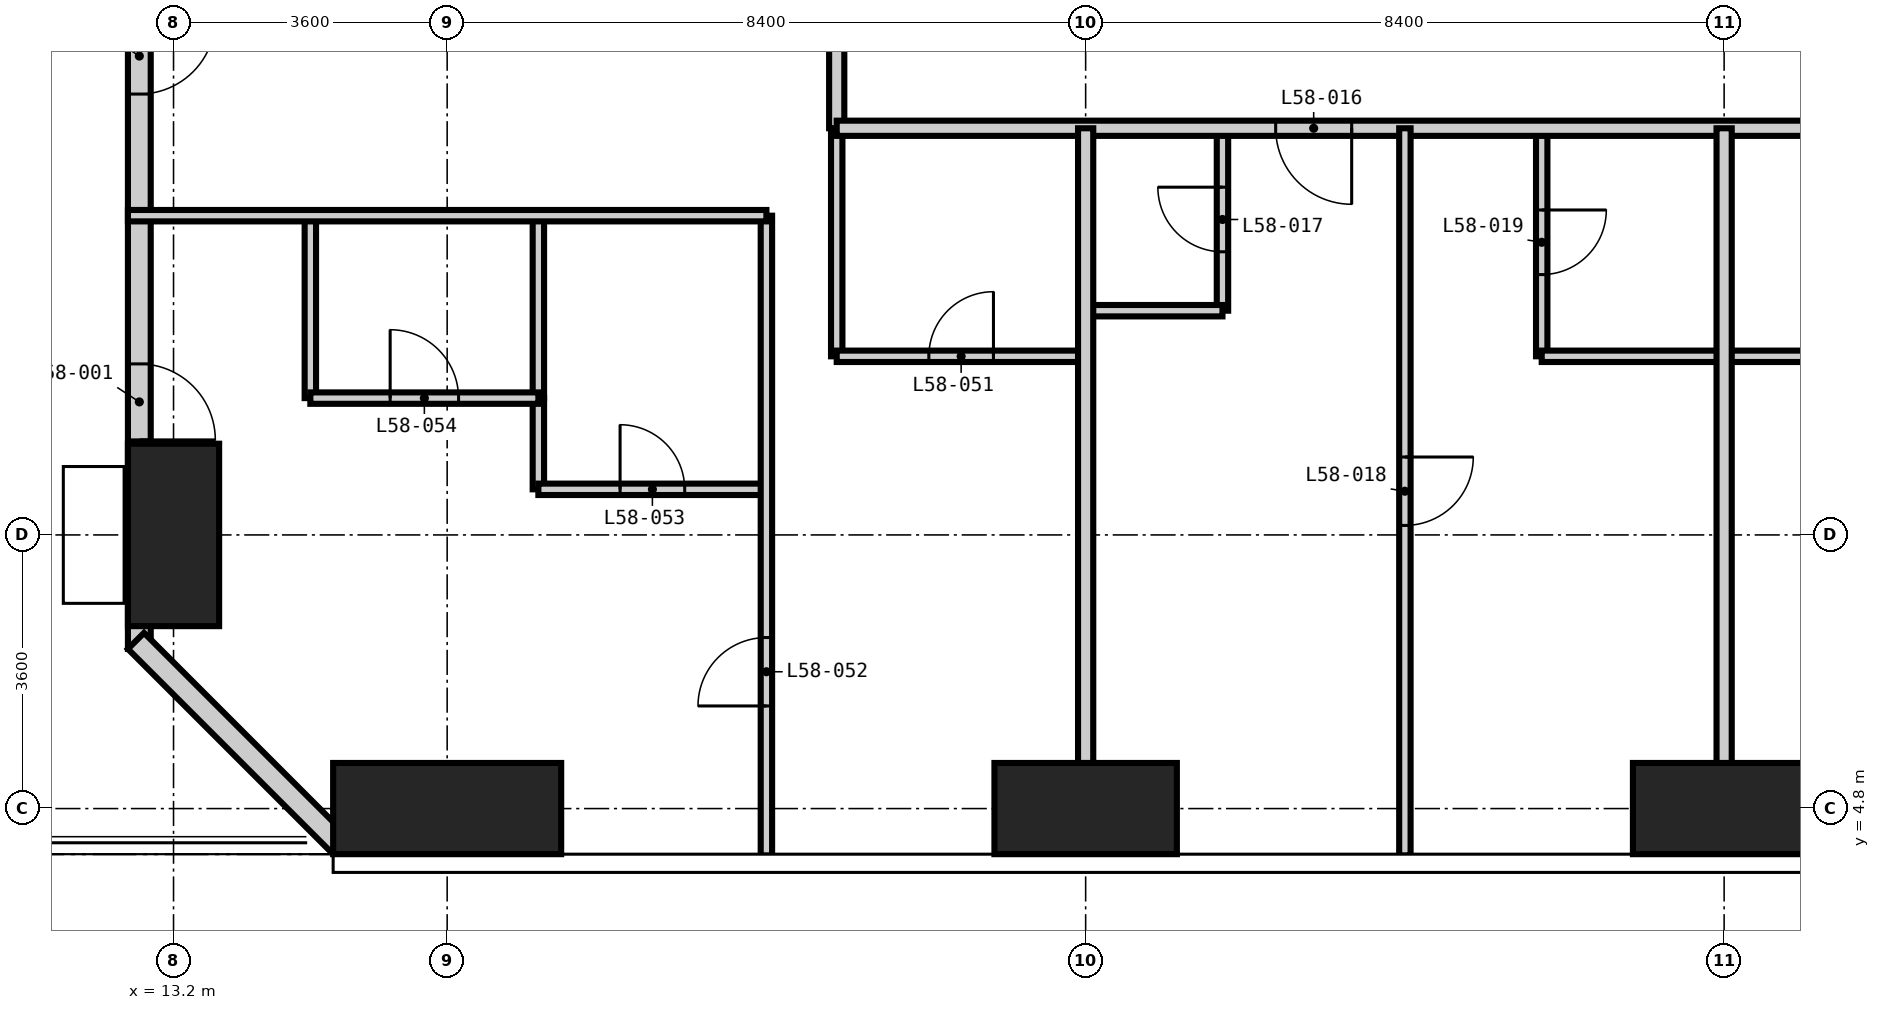
"""IFC4 building model, lengths in metres.
Left out: names, types, materials, properties, quantities, classifications, styles, units other than length and angle.
Written with IfcOpenShell. Run it as: python <this file> out.ifc"""

import sys

from ifc_helpers import new_model, si_unit, direction, frame, frame_2d, origin, origin_2d, place, context, subcontext, project, spatial, rectangle, extrude, element, fill, save


model = new_model("IFC4")
c1 = context("Model", 3, precision=1e-05, world=origin(), true_north=direction((0.0, 1.0)))
c2 = subcontext(c1, "Body", "Model", "MODEL_VIEW")
j1 = project(units=[si_unit("LENGTHUNIT", "METRE"), si_unit("PLANEANGLEUNIT", "RADIAN")], contexts=[c1])
p1 = place(None, origin())
s1 = spatial("IfcSite", under=j1, at=p1, CompositionType="ELEMENT")
p2 = place(p1, origin())
s2 = spatial("IfcBuilding", under=s1, at=p2, CompositionType="ELEMENT")
p3 = place(p2, frame((0.0, 0.0, 225.6)))
s3 = spatial("IfcBuildingStorey", under=s2, at=p3, CompositionType="ELEMENT", Elevation=225.6)
p4 = place(p3, frame((13.2, 8.4, -0.35), z_axis=(0.0, 0.0, 1.0), x_axis=(1.0, 0.0, 0.0)))
e1 = element("IfcColumn", 1, at=p4, inside=s3, PredefinedType="COLUMN", context=c2, shape_type="SweptSolid", body=[
    extrude(rectangle(XDim=1.2, YDim=2.4, at=origin_2d()), origin(), (0.0, 0.0, 1.0), 3.9),
])
p5 = place(p3, frame((16.8, 4.8, -0.35), z_axis=(0.0, 0.0, 1.0), x_axis=(1.0, 0.0, 0.0)))
e2 = element("IfcColumn", 2, at=p5, inside=s3, PredefinedType="COLUMN", context=c2, shape_type="SweptSolid", body=[
    extrude(rectangle(XDim=3.0, YDim=1.2, at=origin_2d()), origin(), (0.0, 0.0, 1.0), 3.9),
])
for number, where, z_axis, x_axis in (
    (3, (25.2, 4.8, -0.35), (0.0, 0.0, 1.0), (1.0, 0.0, 0.0)),
    (4, (33.6, 4.8, -0.35), (0.0, 0.0, 1.0), (1.0, 0.0, 0.0)),
):
    element("IfcColumn", number, at=place(p3, frame(where, z_axis=z_axis, x_axis=x_axis)), inside=s3, PredefinedType="COLUMN", context=c2, shape_type="SweptSolid", body=[
        extrude(rectangle(XDim=2.4, YDim=1.2, at=origin_2d()), origin(), (0.0, 0.0, 1.0), 3.9),
    ])
p6 = place(p3, frame((12.75, 51.9, 0.0), z_axis=(0.0, 0.0, 1.0), x_axis=(0.0, -1.0, 0.0)))
e5 = element("IfcWall", 5, at=p6, inside=s3, PredefinedType="SOLIDWALL", context=c2, shape_type="SweptSolid", body=[
    extrude(rectangle(XDim=45.0, YDim=0.3, at=frame_2d((22.5, 0.0))), origin(), (0.0, 0.0, 1.0), 3.1),
])
p7 = place(p6, frame((41.25, 0.0, 0.0)))
e6 = element("IfcOpeningElement", 6, at=p7, cuts=e5, PredefinedType="OPENING", context=c2, shape_type="SweptSolid", body=[
    extrude(rectangle(XDim=1.0, YDim=2.4, at=frame_2d((0.5, 1.2))), frame((0.0, 0.16, 0.0), z_axis=(0.0, -1.0, 0.0), x_axis=(1.0, 0.0, 0.0)), (0.0, 0.0, 1.0), 0.32),
])
p8 = place(p6, frame((36.7, 0.0, 0.0)))
e7 = element("IfcOpeningElement", 7, at=p8, cuts=e5, PredefinedType="OPENING", context=c2, shape_type="SweptSolid", body=[
    extrude(rectangle(XDim=1.0, YDim=2.4, at=frame_2d((0.5, 1.2))), frame((0.0, 0.16, 0.0), z_axis=(0.0, -1.0, 0.0), x_axis=(1.0, 0.0, 0.0)), (0.0, 0.0, 1.0), 0.32),
])
p9 = place(p6, frame((30.4, 0.0, 0.0)))
e8 = element("IfcOpeningElement", 8, at=p9, cuts=e5, PredefinedType="OPENING", context=c2, shape_type="SweptSolid", body=[
    extrude(rectangle(XDim=1.0, YDim=2.4, at=frame_2d((0.5, 1.2))), frame((0.0, 0.16, 0.0), z_axis=(0.0, -1.0, 0.0), x_axis=(1.0, 0.0, 0.0)), (0.0, 0.0, 1.0), 0.32),
])
p10 = place(p6, frame((31.7, 0.0, 0.6)))
e9 = element("IfcOpeningElement", 9, at=p10, cuts=e5, PredefinedType="OPENING", context=c2, shape_type="SweptSolid", body=[
    extrude(rectangle(XDim=1.8, YDim=2.1, at=frame_2d((0.9, 1.05))), frame((0.0, 0.16, 0.0), z_axis=(0.0, -1.0, 0.0), x_axis=(1.0, 0.0, 0.0)), (0.0, 0.0, 1.0), 0.32),
])
p11 = place(p6, frame((28.0, 0.0, 0.6)))
e10 = element("IfcOpeningElement", 10, at=p11, cuts=e5, PredefinedType="OPENING", context=c2, shape_type="SweptSolid", body=[
    extrude(rectangle(XDim=1.8, YDim=2.1, at=frame_2d((0.9, 1.05))), frame((0.0, 0.16, 0.0), z_axis=(0.0, -1.0, 0.0), x_axis=(1.0, 0.0, 0.0)), (0.0, 0.0, 1.0), 0.32),
])
p12 = place(p6, frame((24.1, 0.0, 0.0)))
e11 = element("IfcOpeningElement", 11, at=p12, cuts=e5, PredefinedType="OPENING", context=c2, shape_type="SweptSolid", body=[
    extrude(rectangle(XDim=1.0, YDim=2.4, at=frame_2d((0.5, 1.2))), frame((0.0, 0.16, 0.0), z_axis=(0.0, -1.0, 0.0), x_axis=(1.0, 0.0, 0.0)), (0.0, 0.0, 1.0), 0.32),
])
p13 = place(p6, frame((19.9, 0.0, 0.0)))
e12 = element("IfcOpeningElement", 12, at=p13, cuts=e5, PredefinedType="OPENING", context=c2, shape_type="SweptSolid", body=[
    extrude(rectangle(XDim=1.0, YDim=2.4, at=frame_2d((0.5, 1.2))), frame((0.0, 0.16, 0.0), z_axis=(0.0, -1.0, 0.0), x_axis=(1.0, 0.0, 0.0)), (0.0, 0.0, 1.0), 0.32),
])
p14 = place(p6, frame((15.7, 0.0, 0.0)))
e13 = element("IfcOpeningElement", 13, at=p14, cuts=e5, PredefinedType="OPENING", context=c2, shape_type="SweptSolid", body=[
    extrude(rectangle(XDim=1.0, YDim=2.4, at=frame_2d((0.5, 1.2))), frame((0.0, 0.16, 0.0), z_axis=(0.0, -1.0, 0.0), x_axis=(1.0, 0.0, 0.0)), (0.0, 0.0, 1.0), 0.32),
])
p15 = place(p6, frame((11.5, 0.0, 0.0)))
e14 = element("IfcOpeningElement", 14, at=p15, cuts=e5, PredefinedType="OPENING", context=c2, shape_type="SweptSolid", body=[
    extrude(rectangle(XDim=1.0, YDim=2.4, at=frame_2d((0.5, 1.2))), frame((0.0, 0.16, 0.0), z_axis=(0.0, -1.0, 0.0), x_axis=(1.0, 0.0, 0.0)), (0.0, 0.0, 1.0), 0.32),
])
p16 = place(p6, frame((7.3, 0.0, 0.0)))
e15 = element("IfcOpeningElement", 15, at=p16, cuts=e5, PredefinedType="OPENING", context=c2, shape_type="SweptSolid", body=[
    extrude(rectangle(XDim=1.0, YDim=2.4, at=frame_2d((0.5, 1.2))), frame((0.0, 0.16, 0.0), z_axis=(0.0, -1.0, 0.0), x_axis=(1.0, 0.0, 0.0)), (0.0, 0.0, 1.0), 0.32),
])
p17 = place(p6, frame((2.75, 0.0, 0.0)))
e16 = element("IfcOpeningElement", 16, at=p17, cuts=e5, PredefinedType="OPENING", context=c2, shape_type="SweptSolid", body=[
    extrude(rectangle(XDim=1.0, YDim=2.4, at=frame_2d((0.5, 1.2))), frame((0.0, 0.16, 0.0), z_axis=(0.0, -1.0, 0.0), x_axis=(1.0, 0.0, 0.0)), (0.0, 0.0, 1.0), 0.32),
])
p18 = place(p3, frame((12.706, 7.006, 0.0), z_axis=(0.0, 0.0, 1.0), x_axis=(0.707074812166, -0.707138748762, 0.0)))
e17 = element("IfcWall", 17, at=p18, inside=s3, PredefinedType="SOLIDWALL", context=c2, shape_type="SweptSolid", body=[
    extrude(rectangle(XDim=3.818, YDim=0.3, at=frame_2d((1.909, 0.0))), origin(), (0.0, 0.0, 1.0), 3.55),
])
p19 = place(p3, frame((18.0, 9.0, 0.0), z_axis=(0.0, 0.0, 1.0), x_axis=(0.0, 1.0, 0.0)))
e18 = element("IfcWall", 18, at=p19, inside=s3, PredefinedType="PARTITIONING", context=c2, shape_type="SweptSolid", body=[
    extrude(rectangle(XDim=1.2, YDim=0.15, at=frame_2d((0.6, 0.0))), origin(), (0.0, 0.0, 1.0), 3.55),
])
p20 = place(p3, frame((21.925, 10.75, 0.0), z_axis=(0.0, 0.0, 1.0), x_axis=(0.0, 1.0, 0.0)))
e19 = element("IfcWall", 19, at=p20, inside=s3, PredefinedType="PARTITIONING", context=c2, shape_type="SweptSolid", body=[
    extrude(rectangle(XDim=3.0, YDim=0.15, at=frame_2d((1.5, 0.0))), origin(), (0.0, 0.0, 1.0), 3.55),
])
p21 = place(p3, frame((27.0, 11.35, 0.0), z_axis=(0.0, 0.0, 1.0), x_axis=(0.0, 1.0, 0.0)))
e20 = element("IfcWall", 20, at=p21, inside=s3, PredefinedType="PARTITIONING", context=c2, shape_type="SweptSolid", body=[
    extrude(rectangle(XDim=2.4, YDim=0.15, at=frame_2d((1.2, 0.0))), origin(), (0.0, 0.0, 1.0), 3.55),
])
p22 = place(p21, frame((0.775, 0.0, 0.0)))
e21 = element("IfcOpeningElement", 21, at=p22, cuts=e20, PredefinedType="OPENING", context=c2, shape_type="SweptSolid", body=[
    extrude(rectangle(XDim=0.85, YDim=2.1, at=frame_2d((0.425, 1.05))), frame((0.0, 0.085, 0.0), z_axis=(0.0, -1.0, 0.0), x_axis=(1.0, 0.0, 0.0)), (0.0, 0.0, 1.0), 0.17),
])
p23 = place(p3, frame((31.2, 10.75, 0.0), z_axis=(0.0, 0.0, 1.0), x_axis=(0.0, 1.0, 0.0)))
e22 = element("IfcWall", 22, at=p23, inside=s3, PredefinedType="PARTITIONING", context=c2, shape_type="SweptSolid", body=[
    extrude(rectangle(XDim=3.0, YDim=0.15, at=frame_2d((1.5, 0.0))), origin(), (0.0, 0.0, 1.0), 3.55),
])
p24 = place(p23, frame((1.075, 0.0, 0.0)))
e23 = element("IfcOpeningElement", 23, at=p24, cuts=e22, PredefinedType="OPENING", context=c2, shape_type="SweptSolid", body=[
    extrude(rectangle(XDim=0.85, YDim=2.1, at=frame_2d((0.425, 1.05))), frame((0.0, 0.085, 0.0), z_axis=(0.0, -1.0, 0.0), x_axis=(1.0, 0.0, 0.0)), (0.0, 0.0, 1.0), 0.17),
])
p25 = place(p3, frame((18.0, 9.0, 0.0), z_axis=(0.0, 0.0, 1.0), x_axis=(1.0, 0.0, 0.0)))
e24 = element("IfcWall", 24, at=p25, inside=s3, PredefinedType="PARTITIONING", context=c2, shape_type="SweptSolid", body=[
    extrude(rectangle(XDim=3.0, YDim=0.15, at=frame_2d((1.5, 0.0))), origin(), (0.0, 0.0, 1.0), 3.55),
])
p26 = place(p25, frame((1.075, 0.0, 0.0)))
e25 = element("IfcOpeningElement", 25, at=p26, cuts=e24, PredefinedType="OPENING", context=c2, shape_type="SweptSolid", body=[
    extrude(rectangle(XDim=0.85, YDim=2.1, at=frame_2d((0.425, 1.05))), frame((0.0, 0.085, 0.0), z_axis=(0.0, -1.0, 0.0), x_axis=(1.0, 0.0, 0.0)), (0.0, 0.0, 1.0), 0.17),
])
p27 = place(p3, frame((21.925, 10.75, 0.0), z_axis=(0.0, 0.0, 1.0), x_axis=(1.0, 0.0, 0.0)))
e26 = element("IfcWall", 26, at=p27, inside=s3, PredefinedType="PARTITIONING", context=c2, shape_type="SweptSolid", body=[
    extrude(rectangle(XDim=3.275, YDim=0.15, at=frame_2d((1.637, 0.0))), origin(), (0.0, 0.0, 1.0), 3.55),
])
p28 = place(p27, frame((1.212, 0.0, 0.0)))
e27 = element("IfcOpeningElement", 27, at=p28, cuts=e26, PredefinedType="OPENING", context=c2, shape_type="SweptSolid", body=[
    extrude(rectangle(XDim=0.85, YDim=2.1, at=frame_2d((0.425, 1.05))), frame((0.0, 0.085, 0.0), z_axis=(0.0, -1.0, 0.0), x_axis=(1.0, 0.0, 0.0)), (0.0, 0.0, 1.0), 0.17),
])
p29 = place(p3, frame((31.2, 10.75, 0.0), z_axis=(0.0, 0.0, 1.0), x_axis=(1.0, 0.0, 0.0)))
e28 = element("IfcWall", 28, at=p29, inside=s3, PredefinedType="PARTITIONING", context=c2, shape_type="SweptSolid", body=[
    extrude(rectangle(XDim=4.8, YDim=0.15, at=frame_2d((2.4, 0.0))), origin(), (0.0, 0.0, 1.0), 3.55),
])
p30 = place(p3, frame((25.2, 11.35, 0.0), z_axis=(0.0, 0.0, 1.0), x_axis=(1.0, 0.0, 0.0)))
e29 = element("IfcWall", 29, at=p30, inside=s3, PredefinedType="PARTITIONING", context=c2, shape_type="SweptSolid", body=[
    extrude(rectangle(XDim=1.8, YDim=0.15, at=frame_2d((0.9, 0.0))), origin(), (0.0, 0.0, 1.0), 3.55),
])
p31 = place(p3, frame((21.925, 13.75, 0.0), z_axis=(0.0, 0.0, 1.0), x_axis=(0.0, 1.0, 0.0)))
e30 = element("IfcWall", 30, at=p31, inside=s3, PredefinedType="PARTITIONING", context=c2, shape_type="SweptSolid", body=[
    extrude(rectangle(XDim=3.05, YDim=0.2, at=frame_2d((1.525, 0.0))), origin(), (0.0, 0.0, 1.0), 3.55),
])
p32 = place(p31, frame((1.025, 0.0, 0.0)))
e31 = element("IfcOpeningElement", 31, at=p32, cuts=e30, PredefinedType="OPENING", context=c2, shape_type="SweptSolid", body=[
    extrude(rectangle(XDim=1.0, YDim=2.2, at=frame_2d((0.5, 1.1))), frame((0.0, 0.11, 0.0), z_axis=(0.0, -1.0, 0.0), x_axis=(1.0, 0.0, 0.0)), (0.0, 0.0, 1.0), 0.22),
])
p33 = place(p3, frame((45.65, 13.75, 0.0), z_axis=(0.0, 0.0, 1.0), x_axis=(-1.0, 0.0, 0.0)))
e32 = element("IfcWall", 32, at=p33, inside=s3, PredefinedType="PARTITIONING", context=c2, shape_type="SweptSolid", body=[
    extrude(rectangle(XDim=23.725, YDim=0.2, at=frame_2d((11.862, 0.0))), origin(), (0.0, 0.0, 1.0), 3.55),
])
p34 = place(p33, frame((16.95, 0.0, 0.0)))
e33 = element("IfcOpeningElement", 33, at=p34, cuts=e32, PredefinedType="OPENING", context=c2, shape_type="SweptSolid", body=[
    extrude(rectangle(XDim=1.0, YDim=2.2, at=frame_2d((0.5, 1.1))), frame((0.0, 0.11, 0.0), z_axis=(0.0, -1.0, 0.0), x_axis=(1.0, 0.0, 0.0)), (0.0, 0.0, 1.0), 0.22),
])
p35 = place(p33, frame((6.15, 0.0, 0.0)))
e34 = element("IfcOpeningElement", 34, at=p35, cuts=e32, PredefinedType="OPENING", context=c2, shape_type="SweptSolid", body=[
    extrude(rectangle(XDim=1.0, YDim=2.2, at=frame_2d((0.5, 1.1))), frame((0.0, 0.11, 0.0), z_axis=(0.0, -1.0, 0.0), x_axis=(1.0, 0.0, 0.0)), (0.0, 0.0, 1.0), 0.22),
])
for number, where, z_axis, x_axis in (
    (35, (25.2, 4.182, 0.0), (0.0, 0.0, 1.0), (0.0, 1.0, 0.0)),
    (36, (33.6, 4.182, 0.0), (0.0, 0.0, 1.0), (0.0, 1.0, 0.0)),
):
    element("IfcWall", number, at=place(p3, frame(where, z_axis=z_axis, x_axis=x_axis)), inside=s3, PredefinedType="PARTITIONING", context=c2, shape_type="SweptSolid", body=[
        extrude(rectangle(XDim=9.568, YDim=0.2, at=frame_2d((4.784, 0.0))), origin(), (0.0, 0.0, 1.0), 3.55),
    ])
for number, where, z_axis, x_axis in (
    (37, (15.0, 10.2, 0.0), (0.0, 0.0, 1.0), (0.0, 1.0, 0.0)),
    (38, (18.0, 10.2, 0.0), (0.0, 0.0, 1.0), (0.0, 1.0, 0.0)),
):
    element("IfcWall", number, at=place(p3, frame(where, z_axis=z_axis, x_axis=x_axis)), inside=s3, PredefinedType="PARTITIONING", context=c2, shape_type="SweptSolid", body=[
        extrude(rectangle(XDim=2.4, YDim=0.15, at=frame_2d((1.2, 0.0))), origin(), (0.0, 0.0, 1.0), 3.55),
    ])
p36 = place(p3, frame((21.0, 4.182, 0.0), z_axis=(0.0, 0.0, 1.0), x_axis=(0.0, 1.0, 0.0)))
e39 = element("IfcWall", 39, at=p36, inside=s3, PredefinedType="PARTITIONING", context=c2, shape_type="SweptSolid", body=[
    extrude(rectangle(XDim=8.418, YDim=0.15, at=frame_2d((4.209, 0.0))), origin(), (0.0, 0.0, 1.0), 3.55),
])
p37 = place(p36, frame((1.968, 0.0, 0.0)))
e40 = element("IfcOpeningElement", 40, at=p37, cuts=e39, PredefinedType="OPENING", context=c2, shape_type="SweptSolid", body=[
    extrude(rectangle(XDim=0.9, YDim=2.1, at=frame_2d((0.45, 1.05))), frame((0.0, 0.085, 0.0), z_axis=(0.0, -1.0, 0.0), x_axis=(1.0, 0.0, 0.0)), (0.0, 0.0, 1.0), 0.17),
])
p38 = place(p3, frame((29.4, 4.182, 0.0), z_axis=(0.0, 0.0, 1.0), x_axis=(0.0, 1.0, 0.0)))
e41 = element("IfcWall", 41, at=p38, inside=s3, PredefinedType="PARTITIONING", context=c2, shape_type="SweptSolid", body=[
    extrude(rectangle(XDim=9.568, YDim=0.15, at=frame_2d((4.784, 0.0))), origin(), (0.0, 0.0, 1.0), 3.55),
])
p39 = place(p38, frame((4.343, 0.0, 0.0)))
e42 = element("IfcOpeningElement", 42, at=p39, cuts=e41, PredefinedType="OPENING", context=c2, shape_type="SweptSolid", body=[
    extrude(rectangle(XDim=0.9, YDim=2.1, at=frame_2d((0.45, 1.05))), frame((0.0, 0.085, 0.0), z_axis=(0.0, -1.0, 0.0), x_axis=(1.0, 0.0, 0.0)), (0.0, 0.0, 1.0), 0.17),
])
p40 = place(p3, frame((15.0, 10.2, 0.0), z_axis=(0.0, 0.0, 1.0), x_axis=(1.0, 0.0, 0.0)))
e43 = element("IfcWall", 43, at=p40, inside=s3, PredefinedType="PARTITIONING", context=c2, shape_type="SweptSolid", body=[
    extrude(rectangle(XDim=3.0, YDim=0.15, at=frame_2d((1.5, 0.0))), origin(), (0.0, 0.0, 1.0), 3.55),
])
p41 = place(p40, frame((1.05, 0.0, 0.0)))
e44 = element("IfcOpeningElement", 44, at=p41, cuts=e43, PredefinedType="OPENING", context=c2, shape_type="SweptSolid", body=[
    extrude(rectangle(XDim=0.9, YDim=2.1, at=frame_2d((0.45, 1.05))), frame((0.0, 0.085, 0.0), z_axis=(0.0, -1.0, 0.0), x_axis=(1.0, 0.0, 0.0)), (0.0, 0.0, 1.0), 0.17),
])
p42 = place(p3, frame((12.6, 12.6, 0.0), z_axis=(0.0, 0.0, 1.0), x_axis=(1.0, 0.0, 0.0)))
e45 = element("IfcWall", 45, at=p42, inside=s3, PredefinedType="PARTITIONING", context=c2, shape_type="SweptSolid", body=[
    extrude(rectangle(XDim=8.4, YDim=0.15, at=frame_2d((4.2, 0.0))), origin(), (0.0, 0.0, 1.0), 3.55),
])
p43 = place(p7, origin())
e46 = element("IfcDoor", 46, at=p43, inside=s3, OperationType="SINGLE_SWING_RIGHT", PredefinedType="DOOR", context=c2, shape_type="SweptSolid", body=[
    extrude(rectangle(XDim=1.0, YDim=2.4, at=frame_2d((0.5, 1.2))), frame((0.0, 0.025, 0.0), z_axis=(0.0, -1.0, 0.0), x_axis=(1.0, 0.0, 0.0)), (0.0, 0.0, 1.0), 0.05),
])
fill(e6, e46)
p44 = place(p8, origin())
e47 = element("IfcDoor", 47, at=p44, inside=s3, OperationType="SINGLE_SWING_LEFT", PredefinedType="DOOR", context=c2, shape_type="SweptSolid", body=[
    extrude(rectangle(XDim=1.0, YDim=2.4, at=frame_2d((0.5, 1.2))), frame((0.0, 0.025, 0.0), z_axis=(0.0, -1.0, 0.0), x_axis=(1.0, 0.0, 0.0)), (0.0, 0.0, 1.0), 0.05),
])
fill(e7, e47)
p45 = place(p34, origin())
e48 = element("IfcDoor", 48, at=p45, inside=s3, OperationType="SINGLE_SWING_LEFT", PredefinedType="DOOR", context=c2, shape_type="SweptSolid", body=[
    extrude(rectangle(XDim=1.0, YDim=2.2, at=frame_2d((0.5, 1.1))), frame((0.0, 0.025, 0.0), z_axis=(0.0, -1.0, 0.0), x_axis=(1.0, 0.0, 0.0)), (0.0, 0.0, 1.0), 0.05),
])
fill(e33, e48)
p46 = place(p22, origin())
e49 = element("IfcDoor", 49, at=p46, inside=s3, OperationType="SINGLE_SWING_RIGHT", PredefinedType="DOOR", context=c2, shape_type="SweptSolid", body=[
    extrude(rectangle(XDim=0.85, YDim=2.1, at=frame_2d((0.425, 1.05))), frame((0.0, 0.025, 0.0), z_axis=(0.0, -1.0, 0.0), x_axis=(1.0, 0.0, 0.0)), (0.0, 0.0, 1.0), 0.05),
])
fill(e21, e49)
p47 = place(p39, frame((0.9, 0.0, 0.0), z_axis=(0.0, 0.0, 1.0), x_axis=(-1.0, 0.0, 0.0)))
e50 = element("IfcDoor", 50, at=p47, inside=s3, OperationType="SINGLE_SWING_LEFT", PredefinedType="DOOR", context=c2, shape_type="SweptSolid", body=[
    extrude(rectangle(XDim=0.9, YDim=2.1, at=frame_2d((0.45, 1.05))), frame((0.0, 0.025, 0.0), z_axis=(0.0, -1.0, 0.0), x_axis=(1.0, 0.0, 0.0)), (0.0, 0.0, 1.0), 0.05),
])
fill(e42, e50)
p48 = place(p24, frame((0.85, 0.0, 0.0), z_axis=(0.0, 0.0, 1.0), x_axis=(-1.0, 0.0, 0.0)))
e51 = element("IfcDoor", 51, at=p48, inside=s3, OperationType="SINGLE_SWING_LEFT", PredefinedType="DOOR", context=c2, shape_type="SweptSolid", body=[
    extrude(rectangle(XDim=0.85, YDim=2.1, at=frame_2d((0.425, 1.05))), frame((0.0, 0.025, 0.0), z_axis=(0.0, -1.0, 0.0), x_axis=(1.0, 0.0, 0.0)), (0.0, 0.0, 1.0), 0.05),
])
fill(e23, e51)
p49 = place(p28, origin())
e52 = element("IfcDoor", 52, at=p49, inside=s3, OperationType="SINGLE_SWING_RIGHT", PredefinedType="DOOR", context=c2, shape_type="SweptSolid", body=[
    extrude(rectangle(XDim=0.85, YDim=2.1, at=frame_2d((0.425, 1.05))), frame((0.0, 0.025, 0.0), z_axis=(0.0, -1.0, 0.0), x_axis=(1.0, 0.0, 0.0)), (0.0, 0.0, 1.0), 0.05),
])
fill(e27, e52)
p50 = place(p37, origin())
e53 = element("IfcDoor", 53, at=p50, inside=s3, OperationType="SINGLE_SWING_LEFT", PredefinedType="DOOR", context=c2, shape_type="SweptSolid", body=[
    extrude(rectangle(XDim=0.9, YDim=2.1, at=frame_2d((0.45, 1.05))), frame((0.0, 0.025, 0.0), z_axis=(0.0, -1.0, 0.0), x_axis=(1.0, 0.0, 0.0)), (0.0, 0.0, 1.0), 0.05),
])
fill(e40, e53)
p51 = place(p26, origin())
e54 = element("IfcDoor", 54, at=p51, inside=s3, OperationType="SINGLE_SWING_LEFT", PredefinedType="DOOR", context=c2, shape_type="SweptSolid", body=[
    extrude(rectangle(XDim=0.85, YDim=2.1, at=frame_2d((0.425, 1.05))), frame((0.0, 0.025, 0.0), z_axis=(0.0, -1.0, 0.0), x_axis=(1.0, 0.0, 0.0)), (0.0, 0.0, 1.0), 0.05),
])
fill(e25, e54)
p52 = place(p41, origin())
e55 = element("IfcDoor", 55, at=p52, inside=s3, OperationType="SINGLE_SWING_LEFT", PredefinedType="DOOR", context=c2, shape_type="SweptSolid", body=[
    extrude(rectangle(XDim=0.9, YDim=2.1, at=frame_2d((0.45, 1.05))), frame((0.0, 0.025, 0.0), z_axis=(0.0, -1.0, 0.0), x_axis=(1.0, 0.0, 0.0)), (0.0, 0.0, 1.0), 0.05),
])
fill(e44, e55)
save(model, sys.argv[1])
